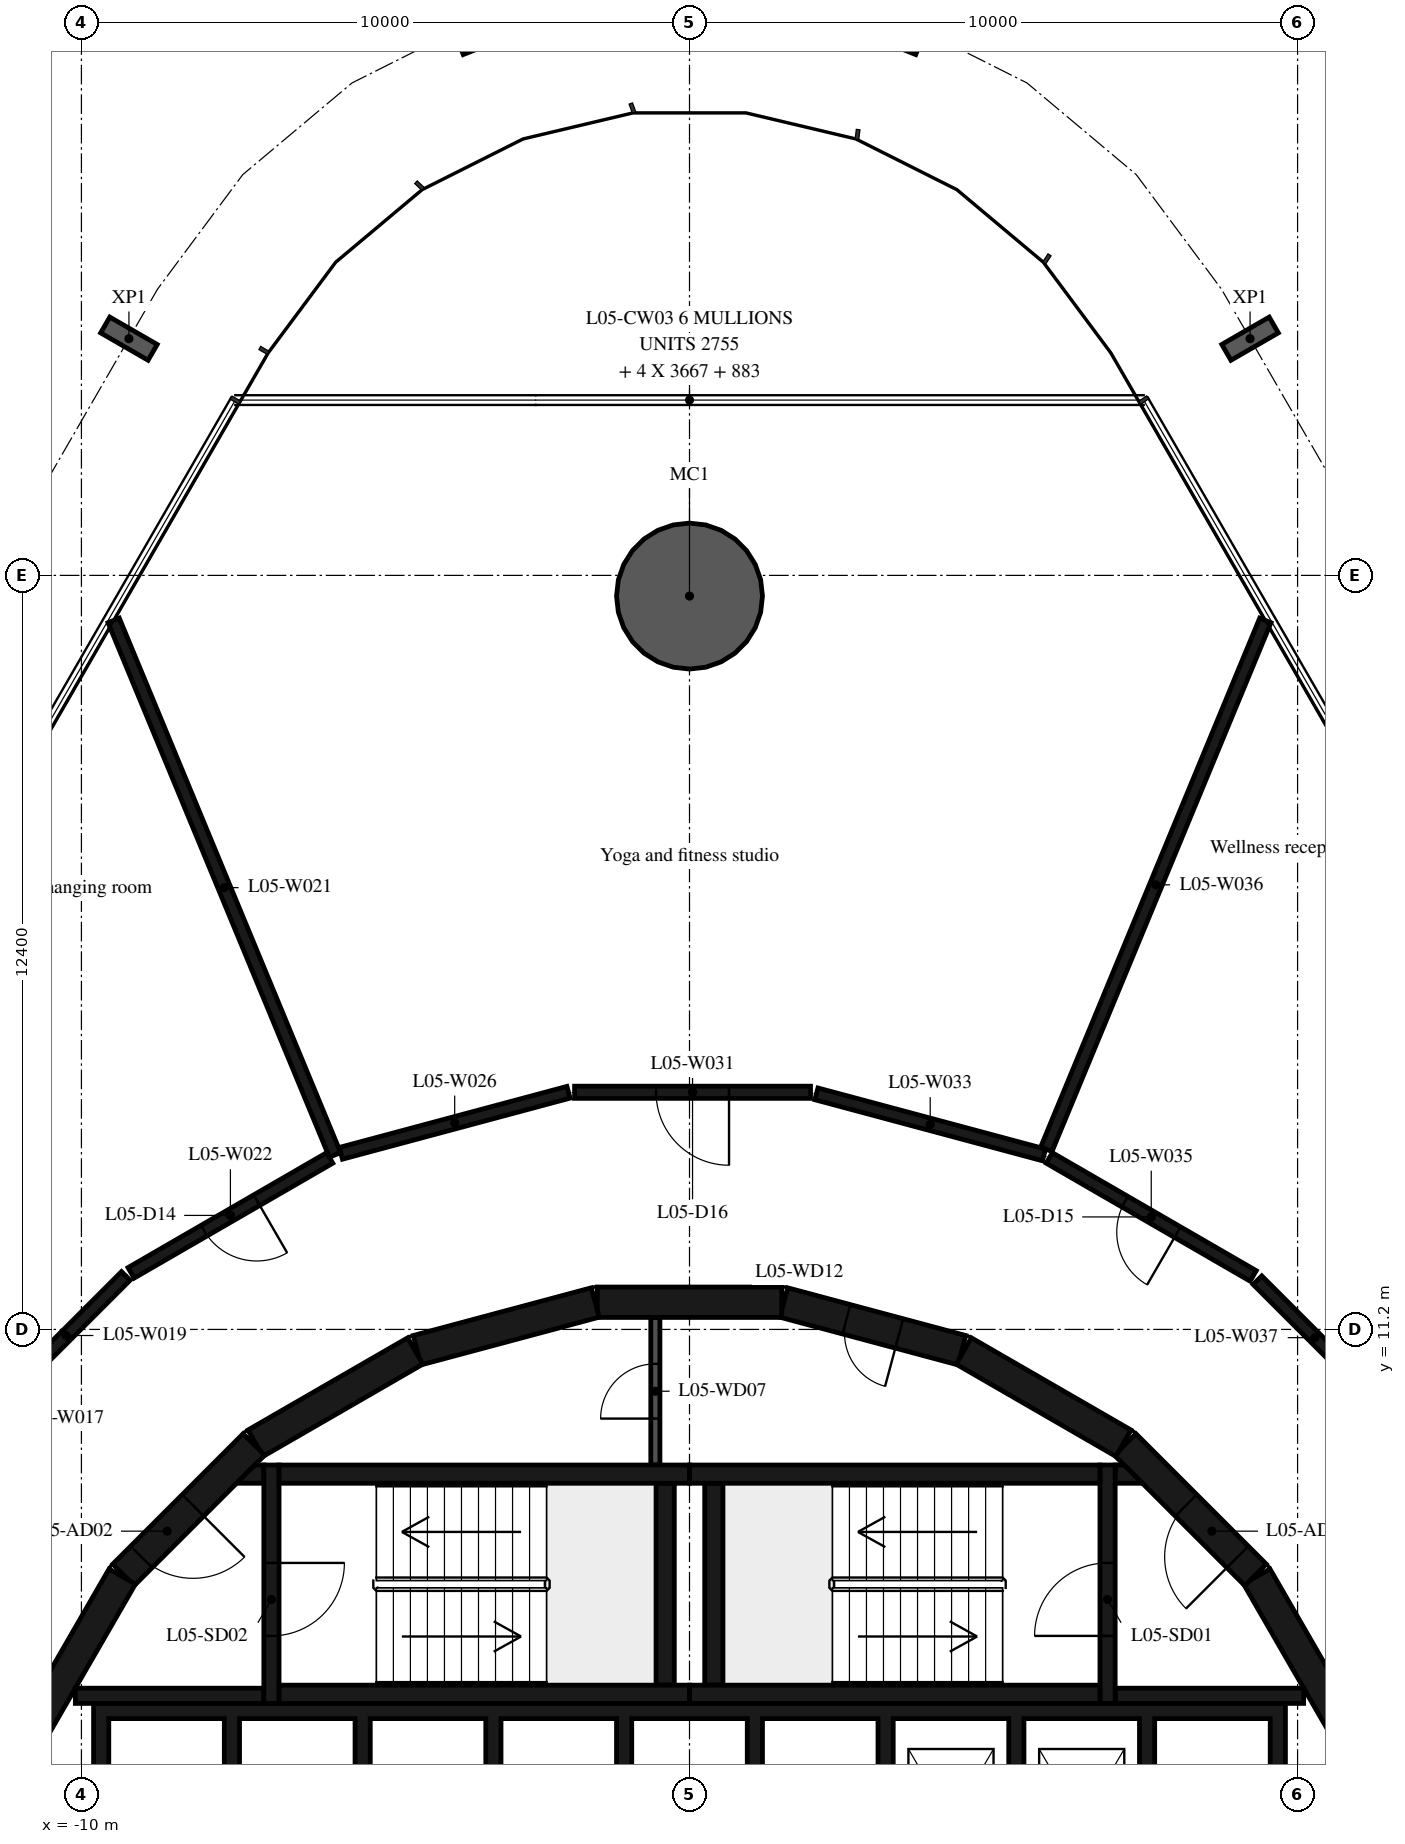
"""IFC4 building model, lengths in metres.
Left out: names, types, materials, properties, quantities, classifications, styles, units other than length and angle.
Written with IfcOpenShell. Run it as: python <this file> out.ifc"""

import sys

from ifc_helpers import new_model, si_unit, direction, frame, frame_2d, origin, origin_2d, place, context, subcontext, project, spatial, polyline, rectangle, hollow_circle, i_section, outline, extrude, element, fill, save


model = new_model("IFC4")
c1 = context("Model", 3, precision=1e-05, world=origin(), true_north=direction((0.0, 1.0)))
c2 = subcontext(c1, "Body", "Model", "MODEL_VIEW")
j1 = project(units=[si_unit("LENGTHUNIT", "METRE"), si_unit("PLANEANGLEUNIT", "RADIAN")], contexts=[c1])
p1 = place(None, origin())
s1 = spatial("IfcSite", under=j1, at=p1, CompositionType="ELEMENT")
p2 = place(p1, origin())
s2 = spatial("IfcBuilding", under=s1, at=p2, CompositionType="ELEMENT")
p3 = place(p2, frame((0.0, 0.0, 28.2)))
s3 = spatial("IfcBuildingStorey", under=s2, at=p3, CompositionType="ELEMENT", Elevation=28.2)
p4 = place(p3, frame((0.0, 23.26, -0.38), z_axis=(0.0, 0.0, 1.0), x_axis=(1.0, 0.0, 0.0)))
e1 = element("IfcColumn", 1, at=p4, inside=s3, PredefinedType="COLUMN", context=c2, shape_type="SweptSolid", body=[
    extrude(hollow_circle(Radius=1.2, WallThickness=0.06, at=origin_2d()), origin(), (0.0, 0.0, 1.0), 4.73),
])
for number, where, z_axis, x_axis in (
    (2, (9.219, 27.493, -0.38), (0.0, 0.0, 1.0), (0.5, -0.866, 0.0)),
    (3, (3.748, 32.639, -0.38), (0.0, 0.0, 1.0), (0.929, -0.371, 0.0)),
    (4, (-3.748, 32.639, -0.38), (0.0, 0.0, 1.0), (0.929, 0.371, 0.0)),
    (5, (-9.219, 27.493, -0.38), (0.0, 0.0, 1.0), (0.5, 0.866, 0.0)),
):
    element("IfcColumn", number, at=place(p3, frame(where, z_axis=z_axis, x_axis=x_axis)), inside=s3, PredefinedType="COLUMN", context=c2, shape_type="SweptSolid", body=[
        extrude(i_section(OverallWidth=0.3, OverallDepth=0.9, WebThickness=0.019, FlangeThickness=0.035, FilletRadius=0.03, at=origin_2d()), origin(), (0.0, 0.0, 1.0), 4.73),
    ])
p5 = place(p3, frame((10.845, 4.51, 0.0), z_axis=(0.0, 0.0, 1.0), x_axis=(-0.500087131594, 0.865975092491, 0.0)))
e6 = element("IfcWall", 6, at=p5, inside=s3, PredefinedType="SHEAR", context=c2, shape_type="SweptSolid", body=[
    extrude(rectangle(XDim=3.033, YDim=0.5, at=frame_2d((1.516, 0.0))), origin(), (0.0, 0.0, 1.0), 4.35),
])
p6 = place(p3, frame((9.308, 7.164, 0.0), z_axis=(0.0, 0.0, 1.0), x_axis=(-0.707106781187, 0.707106781187, 0.0)))
e7 = element("IfcWall", 7, at=p6, inside=s3, PredefinedType="SHEAR", context=c2, shape_type="SweptSolid", body=[
    extrude(rectangle(XDim=3.032, YDim=0.5, at=frame_2d((1.516, 0.0))), origin(), (0.0, 0.0, 1.0), 4.35),
])
p7 = place(p6, frame((0.416, 0.0, 0.0)))
e8 = element("IfcOpeningElement", 8, at=p7, cuts=e7, PredefinedType="OPENING", context=c2, shape_type="SweptSolid", body=[
    extrude(rectangle(XDim=1.2, YDim=2.1, at=frame_2d((0.6, 1.05))), frame((0.0, 0.26, 0.0), z_axis=(0.0, -1.0, 0.0), x_axis=(1.0, 0.0, 0.0)), (0.0, 0.0, 1.0), 0.52),
])
p8 = place(p3, frame((7.137, 9.329, 0.0), z_axis=(0.0, 0.0, 1.0), x_axis=(-0.865975092491, 0.500087131594, 0.0)))
e9 = element("IfcWall", 9, at=p8, inside=s3, PredefinedType="SHEAR", context=c2, shape_type="SweptSolid", body=[
    extrude(rectangle(XDim=3.033, YDim=0.5, at=frame_2d((1.516, 0.0))), origin(), (0.0, 0.0, 1.0), 4.35),
])
p9 = place(p3, frame((4.479, 10.858, 0.0), z_axis=(0.0, 0.0, 1.0), x_axis=(-0.965948410781, 0.258734743916, 0.0)))
e10 = element("IfcWall", 10, at=p9, inside=s3, PredefinedType="SHEAR", context=c2, shape_type="SweptSolid", body=[
    extrude(rectangle(XDim=3.033, YDim=0.5, at=frame_2d((1.516, 0.0))), origin(), (0.0, 0.0, 1.0), 4.35),
])
p10 = place(p9, frame((1.066, 0.0, 0.0)))
e11 = element("IfcOpeningElement", 11, at=p10, cuts=e10, PredefinedType="OPENING", context=c2, shape_type="SweptSolid", body=[
    extrude(rectangle(XDim=0.9, YDim=2.1, at=frame_2d((0.45, 1.05))), frame((0.0, 0.26, 0.0), z_axis=(0.0, -1.0, 0.0), x_axis=(1.0, 0.0, 0.0)), (0.0, 0.0, 1.0), 0.52),
])
for number, where, z_axis, x_axis in (
    (12, (1.516, 11.647, 0.0), (0.0, 0.0, 1.0), (-1.0, 0.0, 0.0)),
    (13, (-1.55, 11.643, 0.0), (0.0, 0.0, 1.0), (-0.966, -0.259, 0.0)),
    (14, (-4.51, 10.845, 0.0), (0.0, 0.0, 1.0), (-0.866, -0.5, 0.0)),
):
    element("IfcWall", number, at=place(p3, frame(where, z_axis=z_axis, x_axis=x_axis)), inside=s3, PredefinedType="SHEAR", context=c2, shape_type="SweptSolid", body=[
        extrude(rectangle(XDim=3.033, YDim=0.5, at=frame_2d((1.516, 0.0))), origin(), (0.0, 0.0, 1.0), 4.35),
    ])
p11 = place(p3, frame((-7.164, 9.308, 0.0), z_axis=(0.0, 0.0, 1.0), x_axis=(-0.707106781187, -0.707106781187, 0.0)))
e15 = element("IfcWall", 15, at=p11, inside=s3, PredefinedType="SHEAR", context=c2, shape_type="SweptSolid", body=[
    extrude(rectangle(XDim=3.032, YDim=0.5, at=frame_2d((1.516, 0.0))), origin(), (0.0, 0.0, 1.0), 4.35),
])
p12 = place(p11, frame((1.416, 0.0, 0.0)))
e16 = element("IfcOpeningElement", 16, at=p12, cuts=e15, PredefinedType="OPENING", context=c2, shape_type="SweptSolid", body=[
    extrude(rectangle(XDim=1.2, YDim=2.1, at=frame_2d((0.6, 1.05))), frame((0.0, 0.26, 0.0), z_axis=(0.0, -1.0, 0.0), x_axis=(1.0, 0.0, 0.0)), (0.0, 0.0, 1.0), 0.52),
])
p13 = place(p3, frame((-9.329, 7.137, 0.0), z_axis=(0.0, 0.0, 1.0), x_axis=(-0.500087131594, -0.865975092491, 0.0)))
e17 = element("IfcWall", 17, at=p13, inside=s3, PredefinedType="SHEAR", context=c2, shape_type="SweptSolid", body=[
    extrude(rectangle(XDim=3.033, YDim=0.5, at=frame_2d((1.516, 0.0))), origin(), (0.0, 0.0, 1.0), 4.35),
])
for number, where, z_axis, x_axis in (
    (18, (0.0, 5.2, 0.0), (0.0, 0.0, 1.0), (1.0, 0.0, 0.0)),
    (19, (0.0, 8.82, 0.0), (0.0, 0.0, 1.0), (1.0, 0.0, 0.0)),
):
    element("IfcWall", number, at=place(p3, frame(where, z_axis=z_axis, x_axis=x_axis)), inside=s3, PredefinedType="SHEAR", context=c2, shape_type="SweptSolid", body=[
        extrude(rectangle(XDim=6.75, YDim=0.3, at=frame_2d((3.375, 0.0))), origin(), (0.0, 0.0, 1.0), 4.35),
    ])
p14 = place(p3, frame((0.4, 5.35, 0.0), z_axis=(0.0, 0.0, 1.0), x_axis=(0.0, 1.0, 0.0)))
e20 = element("IfcWall", 20, at=p14, inside=s3, PredefinedType="SHEAR", context=c2, shape_type="SweptSolid", body=[
    extrude(rectangle(XDim=3.32, YDim=0.3, at=frame_2d((1.66, 0.0))), origin(), (0.0, 0.0, 1.0), 4.35),
])
p15 = place(p3, frame((6.875, 5.05, 0.0), z_axis=(0.0, 0.0, 1.0), x_axis=(0.0, 1.0, 0.0)))
e21 = element("IfcWall", 21, at=p15, inside=s3, PredefinedType="SHEAR", context=c2, shape_type="SweptSolid", body=[
    extrude(rectangle(XDim=3.92, YDim=0.25, at=frame_2d((1.96, 0.0))), origin(), (0.0, 0.0, 1.0), 4.35),
])
p16 = place(p15, frame((1.11, 0.0, 0.0)))
e22 = element("IfcOpeningElement", 22, at=p16, cuts=e21, PredefinedType="OPENING", context=c2, shape_type="SweptSolid", body=[
    extrude(rectangle(XDim=1.2, YDim=2.1, at=frame_2d((0.6, 1.05))), frame((0.0, 0.135, 0.0), z_axis=(0.0, -1.0, 0.0), x_axis=(1.0, 0.0, 0.0)), (0.0, 0.0, 1.0), 0.27),
])
p17 = place(p3, frame((7.0, 5.175, 0.0), z_axis=(0.0, 0.0, 1.0), x_axis=(1.0, 0.0, 0.0)))
e23 = element("IfcWall", 23, at=p17, inside=s3, PredefinedType="SHEAR", context=c2, shape_type="SweptSolid", body=[
    extrude(rectangle(XDim=3.1, YDim=0.25, at=frame_2d((1.55, 0.0))), origin(), (0.0, 0.0, 1.0), 4.35),
])
p18 = place(p3, origin())
e24 = element("IfcWall", 24, at=p18, inside=s3, PredefinedType="SHEAR", context=c2, shape_type="SweptSolid", body=[
    extrude(outline(polyline([(7.448, 8.67), (7.0, 8.67), (7.0, 8.97), (7.148, 8.97), (7.448, 8.67)])), origin(), (0.0, 0.0, 1.0), 4.35),
])
for number, where, z_axis, x_axis in (
    (25, (-6.75, 5.2, 0.0), (0.0, 0.0, 1.0), (1.0, 0.0, 0.0)),
    (26, (-6.75, 8.82, 0.0), (0.0, 0.0, 1.0), (1.0, 0.0, 0.0)),
):
    element("IfcWall", number, at=place(p3, frame(where, z_axis=z_axis, x_axis=x_axis)), inside=s3, PredefinedType="SHEAR", context=c2, shape_type="SweptSolid", body=[
        extrude(rectangle(XDim=6.75, YDim=0.3, at=frame_2d((3.375, 0.0))), origin(), (0.0, 0.0, 1.0), 4.35),
    ])
p19 = place(p3, frame((-0.4, 5.35, 0.0), z_axis=(0.0, 0.0, 1.0), x_axis=(0.0, 1.0, 0.0)))
e27 = element("IfcWall", 27, at=p19, inside=s3, PredefinedType="SHEAR", context=c2, shape_type="SweptSolid", body=[
    extrude(rectangle(XDim=3.32, YDim=0.3, at=frame_2d((1.66, 0.0))), origin(), (0.0, 0.0, 1.0), 4.35),
])
p20 = place(p3, frame((-6.875, 8.97, 0.0), z_axis=(0.0, 0.0, 1.0), x_axis=(0.0, -1.0, 0.0)))
e28 = element("IfcWall", 28, at=p20, inside=s3, PredefinedType="SHEAR", context=c2, shape_type="SweptSolid", body=[
    extrude(rectangle(XDim=3.92, YDim=0.25, at=frame_2d((1.96, 0.0))), origin(), (0.0, 0.0, 1.0), 4.35),
])
p21 = place(p20, frame((1.61, 0.0, 0.0)))
e29 = element("IfcOpeningElement", 29, at=p21, cuts=e28, PredefinedType="OPENING", context=c2, shape_type="SweptSolid", body=[
    extrude(rectangle(XDim=1.2, YDim=2.1, at=frame_2d((0.6, 1.05))), frame((0.0, 0.135, 0.0), z_axis=(0.0, -1.0, 0.0), x_axis=(1.0, 0.0, 0.0)), (0.0, 0.0, 1.0), 0.27),
])
p22 = place(p3, frame((-7.0, 5.175, 0.0), z_axis=(0.0, 0.0, 1.0), x_axis=(-1.0, 0.0, 0.0)))
e30 = element("IfcWall", 30, at=p22, inside=s3, PredefinedType="SHEAR", context=c2, shape_type="SweptSolid", body=[
    extrude(rectangle(XDim=3.1, YDim=0.25, at=frame_2d((1.55, 0.0))), origin(), (0.0, 0.0, 1.0), 4.35),
])
p23 = place(p3, origin())
e31 = element("IfcWall", 31, at=p23, inside=s3, PredefinedType="SHEAR", context=c2, shape_type="SweptSolid", body=[
    extrude(outline(polyline([(-7.148, 8.97), (-7.0, 8.97), (-7.0, 8.67), (-7.448, 8.67), (-7.148, 8.97)])), origin(), (0.0, 0.0, 1.0), 4.35),
])
p24 = place(p3, origin())
e32 = element("IfcWall", 32, at=p24, inside=s3, PredefinedType="SHEAR", context=c2, shape_type="SweptSolid", body=[
    extrude(outline(polyline([(-9.55, 4.8), (-7.65, 4.8), (-7.65, 1.9), (-7.4, 1.9), (-7.4, 4.8), (-5.5, 4.8), (-5.5, 1.9), (-5.25, 1.9), (-5.25, 4.8), (-3.35, 4.8), (-3.35, 1.9), (-3.1, 1.9), (-3.1, 4.8), (-1.2, 4.8), (-1.2, 1.9), (-0.95, 1.9), (-0.95, 4.8), (0.95, 4.8), (0.95, 1.9), (1.2, 1.9), (1.2, 4.8), (3.1, 4.8), (3.1, 1.9), (3.35, 1.9), (3.35, 4.8), (5.25, 4.8), (5.25, 1.9), (5.5, 1.9), (5.5, 4.8), (7.4, 4.8), (7.4, 1.9), (7.65, 1.9), (7.65, 4.8), (9.55, 4.8), (9.55, 1.9), (9.8, 1.9), (9.8, 4.8), (9.8, 5.05), (-9.8, 5.05), (-9.8, 4.8), (-9.8, 1.9), (-9.55, 1.9), (-9.55, 4.8)])), origin(), (0.0, 0.0, 1.0), 4.35),
])
p25 = place(p3, frame((-0.562, 8.97, 0.0), z_axis=(0.0, 0.0, 1.0), x_axis=(0.0, 1.0, 0.0)))
e33 = element("IfcWall", 33, at=p25, inside=s3, PredefinedType="PARTITIONING", context=c2, shape_type="SweptSolid", body=[
    extrude(rectangle(XDim=2.427, YDim=0.15, at=frame_2d((1.214, 0.0))), origin(), (0.0, 0.0, 1.0), 4.35),
])
p26 = place(p25, frame((0.764, 0.0, 0.0)))
e34 = element("IfcOpeningElement", 34, at=p26, cuts=e33, PredefinedType="OPENING", context=c2, shape_type="SweptSolid", body=[
    extrude(rectangle(XDim=0.9, YDim=2.1, at=frame_2d((0.45, 1.05))), frame((0.0, 0.085, 0.0), z_axis=(0.0, -1.0, 0.0), x_axis=(1.0, 0.0, 0.0)), (0.0, 0.0, 1.0), 0.17),
])
p27 = place(p3, frame((-9.27, 12.08, 0.0), z_axis=(0.0, 0.0, 1.0), x_axis=(-0.707106781187, -0.707106781187, 0.0)))
e35 = element("IfcWall", 35, at=p27, inside=s3, PredefinedType="PARTITIONING", context=c2, shape_type="SweptSolid", body=[
    extrude(rectangle(XDim=2.772, YDim=0.2, at=frame_2d((1.386, 0.0))), origin(), (0.0, 0.0, 1.0), 4.35),
])
p28 = place(p3, frame((-5.83, 14.07, 0.0), z_axis=(0.0, 0.0, 1.0), x_axis=(-0.382588257379, 0.923918949538, 0.0)))
e36 = element("IfcWall", 36, at=p28, inside=s3, PredefinedType="PARTITIONING", context=c2, shape_type="SweptSolid", body=[
    extrude(rectangle(XDim=9.514, YDim=0.2, at=frame_2d((4.757, 0.0))), origin(), (0.0, 0.0, 1.0), 4.35),
])
p29 = place(p3, frame((-5.917, 14.02, 0.0), z_axis=(0.0, 0.0, 1.0), x_axis=(-0.865591582237, -0.500750649286, 0.0)))
e37 = element("IfcWall", 37, at=p29, inside=s3, PredefinedType="PARTITIONING", context=c2, shape_type="SweptSolid", body=[
    extrude(rectangle(XDim=3.774, YDim=0.2, at=frame_2d((1.887, 0.0))), origin(), (0.0, 0.0, 1.0), 4.35),
])
p30 = place(p29, frame((1.387, 0.0, 0.0)))
e38 = element("IfcOpeningElement", 38, at=p30, cuts=e37, PredefinedType="OPENING", context=c2, shape_type="SweptSolid", body=[
    extrude(rectangle(XDim=1.0, YDim=2.1, at=frame_2d((0.5, 1.05))), frame((0.0, 0.11, 0.0), z_axis=(0.0, -1.0, 0.0), x_axis=(1.0, 0.0, 0.0)), (0.0, 0.0, 1.0), 0.22),
])
p31 = place(p3, frame((-1.99, 15.1, 0.0), z_axis=(0.0, 0.0, 1.0), x_axis=(-0.96585437197, -0.259085569159, 0.0)))
e39 = element("IfcWall", 39, at=p31, inside=s3, PredefinedType="PARTITIONING", context=c2, shape_type="SweptSolid", body=[
    extrude(rectangle(XDim=3.876, YDim=0.2, at=frame_2d((1.938, 0.0))), origin(), (0.0, 0.0, 1.0), 4.35),
])
p32 = place(p3, frame((1.99, 15.1, 0.0), z_axis=(0.0, 0.0, 1.0), x_axis=(-1.0, 0.0, 0.0)))
e40 = element("IfcWall", 40, at=p32, inside=s3, PredefinedType="PARTITIONING", context=c2, shape_type="SweptSolid", body=[
    extrude(rectangle(XDim=3.88, YDim=0.2, at=frame_2d((1.94, 0.0))), origin(), (0.0, 0.0, 1.0), 4.35),
])
p33 = place(p32, frame((1.34, 0.0, 0.0)))
e41 = element("IfcOpeningElement", 41, at=p33, cuts=e40, PredefinedType="OPENING", context=c2, shape_type="SweptSolid", body=[
    extrude(rectangle(XDim=1.2, YDim=2.1, at=frame_2d((0.6, 1.05))), frame((0.0, 0.11, 0.0), z_axis=(0.0, -1.0, 0.0), x_axis=(1.0, 0.0, 0.0)), (0.0, 0.0, 1.0), 0.22),
])
p34 = place(p3, frame((5.83, 14.07, 0.0), z_axis=(0.0, 0.0, 1.0), x_axis=(-0.965870133458, 0.259026804199, 0.0)))
e42 = element("IfcWall", 42, at=p34, inside=s3, PredefinedType="PARTITIONING", context=c2, shape_type="SweptSolid", body=[
    extrude(rectangle(XDim=3.876, YDim=0.2, at=frame_2d((1.938, 0.0))), origin(), (0.0, 0.0, 1.0), 4.35),
])
p35 = place(p3, frame((9.27, 12.08, 0.0), z_axis=(0.0, 0.0, 1.0), x_axis=(-0.865601686425, 0.500733182901, 0.0)))
e43 = element("IfcWall", 43, at=p35, inside=s3, PredefinedType="PARTITIONING", context=c2, shape_type="SweptSolid", body=[
    extrude(rectangle(XDim=3.874, YDim=0.2, at=frame_2d((1.937, 0.0))), origin(), (0.0, 0.0, 1.0), 4.35),
])
p36 = place(p35, frame((1.437, 0.0, 0.0)))
e44 = element("IfcOpeningElement", 44, at=p36, cuts=e43, PredefinedType="OPENING", context=c2, shape_type="SweptSolid", body=[
    extrude(rectangle(XDim=1.0, YDim=2.1, at=frame_2d((0.5, 1.05))), frame((0.0, 0.11, 0.0), z_axis=(0.0, -1.0, 0.0), x_axis=(1.0, 0.0, 0.0)), (0.0, 0.0, 1.0), 0.22),
])
p37 = place(p3, frame((9.47, 22.86, 0.0), z_axis=(0.0, 0.0, 1.0), x_axis=(-0.382599926304, -0.923914117433, 0.0)))
e45 = element("IfcWall", 45, at=p37, inside=s3, PredefinedType="PARTITIONING", context=c2, shape_type="SweptSolid", body=[
    extrude(rectangle(XDim=9.414, YDim=0.2, at=frame_2d((4.707, 0.0))), origin(), (0.0, 0.0, 1.0), 4.35),
])
p38 = place(p3, frame((11.23, 10.12, 0.0), z_axis=(0.0, 0.0, 1.0), x_axis=(-0.707106781187, 0.707106781187, 0.0)))
e46 = element("IfcWall", 46, at=p38, inside=s3, PredefinedType="PARTITIONING", context=c2, shape_type="SweptSolid", body=[
    extrude(rectangle(XDim=2.672, YDim=0.2, at=frame_2d((1.336, 0.0))), origin(), (0.0, 0.0, 1.0), 4.35),
])
p39 = place(p16, origin())
e47 = element("IfcDoor", 47, at=p39, inside=s3, OperationType="SINGLE_SWING_LEFT", PredefinedType="DOOR", context=c2, shape_type="SweptSolid", body=[
    extrude(rectangle(XDim=1.2, YDim=2.1, at=frame_2d((0.6, 1.05))), frame((0.0, 0.025, 0.0), z_axis=(0.0, -1.0, 0.0), x_axis=(1.0, 0.0, 0.0)), (0.0, 0.0, 1.0), 0.05),
])
fill(e22, e47)
p40 = place(p7, origin())
e48 = element("IfcDoor", 48, at=p40, inside=s3, OperationType="SINGLE_SWING_RIGHT", PredefinedType="DOOR", context=c2, shape_type="SweptSolid", body=[
    extrude(rectangle(XDim=1.2, YDim=2.1, at=frame_2d((0.6, 1.05))), frame((0.0, 0.025, 0.0), z_axis=(0.0, -1.0, 0.0), x_axis=(1.0, 0.0, 0.0)), (0.0, 0.0, 1.0), 0.05),
])
fill(e8, e48)
p41 = place(p21, origin())
e49 = element("IfcDoor", 49, at=p41, inside=s3, OperationType="SINGLE_SWING_LEFT", PredefinedType="DOOR", context=c2, shape_type="SweptSolid", body=[
    extrude(rectangle(XDim=1.2, YDim=2.1, at=frame_2d((0.6, 1.05))), frame((0.0, 0.025, 0.0), z_axis=(0.0, -1.0, 0.0), x_axis=(1.0, 0.0, 0.0)), (0.0, 0.0, 1.0), 0.05),
])
fill(e29, e49)
p42 = place(p12, origin())
e50 = element("IfcDoor", 50, at=p42, inside=s3, OperationType="SINGLE_SWING_RIGHT", PredefinedType="DOOR", context=c2, shape_type="SweptSolid", body=[
    extrude(rectangle(XDim=1.2, YDim=2.1, at=frame_2d((0.6, 1.05))), frame((0.0, 0.025, 0.0), z_axis=(0.0, -1.0, 0.0), x_axis=(1.0, 0.0, 0.0)), (0.0, 0.0, 1.0), 0.05),
])
fill(e16, e50)
p43 = place(p26, origin())
e51 = element("IfcDoor", 51, at=p43, inside=s3, OperationType="SINGLE_SWING_RIGHT", PredefinedType="DOOR", context=c2, shape_type="SweptSolid", body=[
    extrude(rectangle(XDim=0.9, YDim=2.1, at=frame_2d((0.45, 1.05))), frame((0.0, 0.025, 0.0), z_axis=(0.0, -1.0, 0.0), x_axis=(1.0, 0.0, 0.0)), (0.0, 0.0, 1.0), 0.05),
])
fill(e34, e51)
p44 = place(p10, origin())
e52 = element("IfcDoor", 52, at=p44, inside=s3, OperationType="SINGLE_SWING_LEFT", PredefinedType="DOOR", context=c2, shape_type="SweptSolid", body=[
    extrude(rectangle(XDim=0.9, YDim=2.1, at=frame_2d((0.45, 1.05))), frame((0.0, 0.025, 0.0), z_axis=(0.0, -1.0, 0.0), x_axis=(1.0, 0.0, 0.0)), (0.0, 0.0, 1.0), 0.05),
])
fill(e11, e52)
p45 = place(p30, origin())
e53 = element("IfcDoor", 53, at=p45, inside=s3, OperationType="SINGLE_SWING_LEFT", PredefinedType="DOOR", context=c2, shape_type="SweptSolid", body=[
    extrude(rectangle(XDim=1.0, YDim=2.1, at=frame_2d((0.5, 1.05))), frame((0.0, 0.025, 0.0), z_axis=(0.0, -1.0, 0.0), x_axis=(1.0, 0.0, 0.0)), (0.0, 0.0, 1.0), 0.05),
])
fill(e38, e53)
p46 = place(p36, origin())
e54 = element("IfcDoor", 54, at=p46, inside=s3, OperationType="SINGLE_SWING_LEFT", PredefinedType="DOOR", context=c2, shape_type="SweptSolid", body=[
    extrude(rectangle(XDim=1.0, YDim=2.1, at=frame_2d((0.5, 1.05))), frame((0.0, 0.025, 0.0), z_axis=(0.0, -1.0, 0.0), x_axis=(1.0, 0.0, 0.0)), (0.0, 0.0, 1.0), 0.05),
])
fill(e44, e54)
p47 = place(p33, origin())
e55 = element("IfcDoor", 55, at=p47, inside=s3, OperationType="SINGLE_SWING_LEFT", PredefinedType="DOOR", context=c2, shape_type="SweptSolid", body=[
    extrude(rectangle(XDim=1.2, YDim=2.1, at=frame_2d((0.6, 1.05))), frame((0.0, 0.025, 0.0), z_axis=(0.0, -1.0, 0.0), x_axis=(1.0, 0.0, 0.0)), (0.0, 0.0, 1.0), 0.05),
])
fill(e41, e55)
save(model, sys.argv[1])
